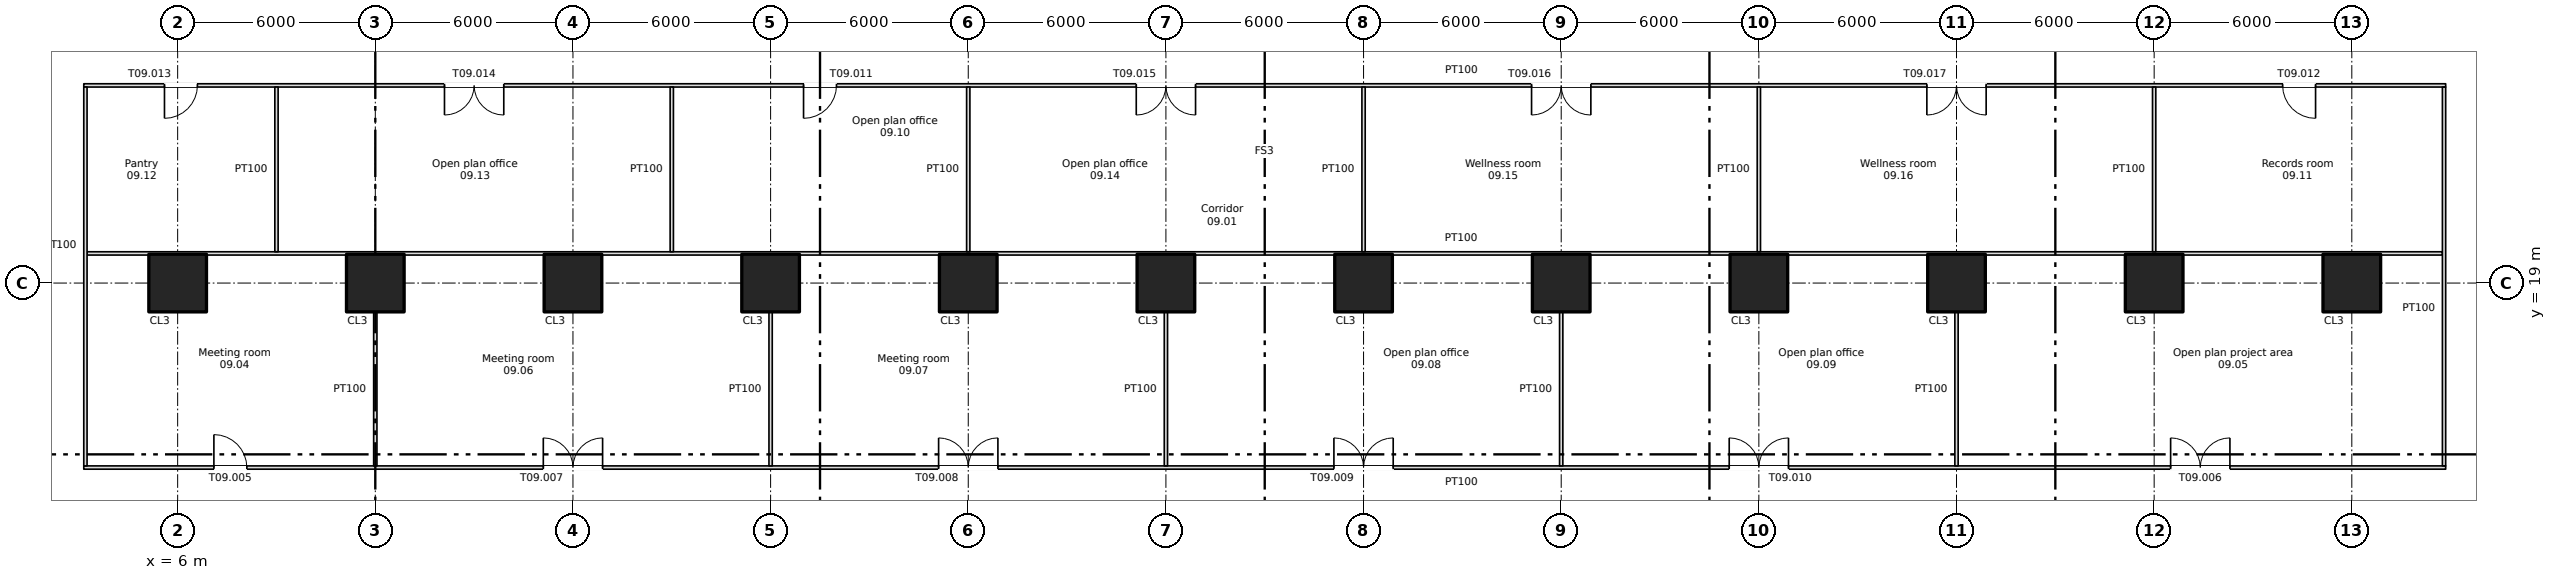
"""IFC4 building model, lengths in metres.
Left out: names, types, materials, properties, quantities, classifications, styles, units other than length and angle.
Written with IfcOpenShell. Run it as: python <this file> out.ifc"""

import sys

from ifc_helpers import new_model, si_unit, direction, frame, frame_2d, origin, origin_2d, place, context, subcontext, project, spatial, rectangle, extrude, element, fill, save


model = new_model("IFC4")
c1 = context("Model", 3, precision=1e-05, world=origin(), true_north=direction((0.0, 1.0)))
c2 = subcontext(c1, "Body", "Model", "MODEL_VIEW")
j1 = project(units=[si_unit("LENGTHUNIT", "METRE"), si_unit("PLANEANGLEUNIT", "RADIAN")], contexts=[c1])
p1 = place(None, origin())
s1 = spatial("IfcSite", under=j1, at=p1, CompositionType="ELEMENT")
p2 = place(p1, origin())
s2 = spatial("IfcBuilding", under=s1, at=p2, CompositionType="ELEMENT")
p3 = place(p2, frame((0.0, 0.0, 41.25)))
s3 = spatial("IfcBuildingStorey", under=s2, at=p3, CompositionType="ELEMENT", Elevation=41.25)
for number, where, z_axis, x_axis in (
    (1, (6.0, 19.0, 0.0), (0.0, 0.0, 1.0), (1.0, 0.0, 0.0)),
    (2, (12.0, 19.0, 0.0), (0.0, 0.0, 1.0), (1.0, 0.0, 0.0)),
    (3, (18.0, 19.0, 0.0), (0.0, 0.0, 1.0), (1.0, 0.0, 0.0)),
    (4, (24.0, 19.0, 0.0), (0.0, 0.0, 1.0), (1.0, 0.0, 0.0)),
    (5, (30.0, 19.0, 0.0), (0.0, 0.0, 1.0), (1.0, 0.0, 0.0)),
    (6, (36.0, 19.0, 0.0), (0.0, 0.0, 1.0), (1.0, 0.0, 0.0)),
    (7, (42.0, 19.0, 0.0), (0.0, 0.0, 1.0), (1.0, 0.0, 0.0)),
    (8, (48.0, 19.0, 0.0), (0.0, 0.0, 1.0), (1.0, 0.0, 0.0)),
    (9, (54.0, 19.0, 0.0), (0.0, 0.0, 1.0), (1.0, 0.0, 0.0)),
    (10, (60.0, 19.0, 0.0), (0.0, 0.0, 1.0), (1.0, 0.0, 0.0)),
    (11, (66.0, 19.0, 0.0), (0.0, 0.0, 1.0), (1.0, 0.0, 0.0)),
    (12, (72.0, 19.0, 0.0), (0.0, 0.0, 1.0), (1.0, 0.0, 0.0)),
):
    element("IfcColumn", number, at=place(p3, frame(where, z_axis=z_axis, x_axis=x_axis)), inside=s3, PredefinedType="COLUMN", context=c2, shape_type="SweptSolid", body=[
        extrude(rectangle(XDim=1.75, YDim=1.75, at=origin_2d()), origin(), (0.0, 0.0, 1.0), 3.35),
    ])
p4 = place(p3, frame((3.15, 13.4, 0.0), z_axis=(0.0, 0.0, 1.0), x_axis=(1.0, 0.0, 0.0)))
e13 = element("IfcWall", 13, at=p4, inside=s3, PredefinedType="PARTITIONING", context=c2, shape_type="SweptSolid", body=[
    extrude(rectangle(XDim=71.7, YDim=0.1, at=frame_2d((35.85, 0.0))), origin(), (0.0, 0.0, 1.0), 3.35),
])
p5 = place(p4, frame((3.95, 0.0, 0.0)))
e14 = element("IfcOpeningElement", 14, at=p5, cuts=e13, PredefinedType="OPENING", context=c2, shape_type="SweptSolid", body=[
    extrude(rectangle(XDim=1.0, YDim=2.1, at=frame_2d((0.5, 1.05))), frame((0.0, 0.06, 0.0), z_axis=(0.0, -1.0, 0.0), x_axis=(1.0, 0.0, 0.0)), (0.0, 0.0, 1.0), 0.12),
])
p6 = place(p4, frame((63.35, 0.0, 0.0)))
e15 = element("IfcOpeningElement", 15, at=p6, cuts=e13, PredefinedType="OPENING", context=c2, shape_type="SweptSolid", body=[
    extrude(rectangle(XDim=1.8, YDim=2.1, at=frame_2d((0.9, 1.05))), frame((0.0, 0.06, 0.0), z_axis=(0.0, -1.0, 0.0), x_axis=(1.0, 0.0, 0.0)), (0.0, 0.0, 1.0), 0.12),
])
p7 = place(p4, frame((13.95, 0.0, 0.0)))
e16 = element("IfcOpeningElement", 16, at=p7, cuts=e13, PredefinedType="OPENING", context=c2, shape_type="SweptSolid", body=[
    extrude(rectangle(XDim=1.8, YDim=2.1, at=frame_2d((0.9, 1.05))), frame((0.0, 0.06, 0.0), z_axis=(0.0, -1.0, 0.0), x_axis=(1.0, 0.0, 0.0)), (0.0, 0.0, 1.0), 0.12),
])
p8 = place(p4, frame((25.95, 0.0, 0.0)))
e17 = element("IfcOpeningElement", 17, at=p8, cuts=e13, PredefinedType="OPENING", context=c2, shape_type="SweptSolid", body=[
    extrude(rectangle(XDim=1.8, YDim=2.1, at=frame_2d((0.9, 1.05))), frame((0.0, 0.06, 0.0), z_axis=(0.0, -1.0, 0.0), x_axis=(1.0, 0.0, 0.0)), (0.0, 0.0, 1.0), 0.12),
])
p9 = place(p4, frame((37.95, 0.0, 0.0)))
e18 = element("IfcOpeningElement", 18, at=p9, cuts=e13, PredefinedType="OPENING", context=c2, shape_type="SweptSolid", body=[
    extrude(rectangle(XDim=1.8, YDim=2.1, at=frame_2d((0.9, 1.05))), frame((0.0, 0.06, 0.0), z_axis=(0.0, -1.0, 0.0), x_axis=(1.0, 0.0, 0.0)), (0.0, 0.0, 1.0), 0.12),
])
p10 = place(p4, frame((49.95, 0.0, 0.0)))
e19 = element("IfcOpeningElement", 19, at=p10, cuts=e13, PredefinedType="OPENING", context=c2, shape_type="SweptSolid", body=[
    extrude(rectangle(XDim=1.8, YDim=2.1, at=frame_2d((0.9, 1.05))), frame((0.0, 0.06, 0.0), z_axis=(0.0, -1.0, 0.0), x_axis=(1.0, 0.0, 0.0)), (0.0, 0.0, 1.0), 0.12),
])
p11 = place(p3, frame((3.25, 19.9, 0.0), z_axis=(0.0, 0.0, 1.0), x_axis=(1.0, 0.0, 0.0)))
e20 = element("IfcWall", 20, at=p11, inside=s3, PredefinedType="PARTITIONING", context=c2, shape_type="SweptSolid", body=[
    extrude(rectangle(XDim=71.5, YDim=0.1, at=frame_2d((35.75, 0.0))), origin(), (0.0, 0.0, 1.0), 3.35),
])
p12 = place(p3, frame((3.15, 25.0, 0.0), z_axis=(0.0, 0.0, 1.0), x_axis=(1.0, 0.0, 0.0)))
e21 = element("IfcWall", 21, at=p12, inside=s3, PredefinedType="PARTITIONING", context=c2, shape_type="SweptSolid", body=[
    extrude(rectangle(XDim=71.7, YDim=0.1, at=frame_2d((35.85, 0.0))), origin(), (0.0, 0.0, 1.0), 3.35),
])
p13 = place(p12, frame((21.85, 0.0, 0.0)))
e22 = element("IfcOpeningElement", 22, at=p13, cuts=e21, PredefinedType="OPENING", context=c2, shape_type="SweptSolid", body=[
    extrude(rectangle(XDim=1.0, YDim=2.1, at=frame_2d((0.5, 1.05))), frame((0.0, 0.06, 0.0), z_axis=(0.0, -1.0, 0.0), x_axis=(1.0, 0.0, 0.0)), (0.0, 0.0, 1.0), 0.12),
])
p14 = place(p12, frame((66.75, 0.0, 0.0)))
e23 = element("IfcOpeningElement", 23, at=p14, cuts=e21, PredefinedType="OPENING", context=c2, shape_type="SweptSolid", body=[
    extrude(rectangle(XDim=1.0, YDim=2.1, at=frame_2d((0.5, 1.05))), frame((0.0, 0.06, 0.0), z_axis=(0.0, -1.0, 0.0), x_axis=(1.0, 0.0, 0.0)), (0.0, 0.0, 1.0), 0.12),
])
p15 = place(p12, frame((2.45, 0.0, 0.0)))
e24 = element("IfcOpeningElement", 24, at=p15, cuts=e21, PredefinedType="OPENING", context=c2, shape_type="SweptSolid", body=[
    extrude(rectangle(XDim=1.0, YDim=2.1, at=frame_2d((0.5, 1.05))), frame((0.0, 0.06, 0.0), z_axis=(0.0, -1.0, 0.0), x_axis=(1.0, 0.0, 0.0)), (0.0, 0.0, 1.0), 0.12),
])
p16 = place(p12, frame((10.95, 0.0, 0.0)))
e25 = element("IfcOpeningElement", 25, at=p16, cuts=e21, PredefinedType="OPENING", context=c2, shape_type="SweptSolid", body=[
    extrude(rectangle(XDim=1.8, YDim=2.1, at=frame_2d((0.9, 1.05))), frame((0.0, 0.06, 0.0), z_axis=(0.0, -1.0, 0.0), x_axis=(1.0, 0.0, 0.0)), (0.0, 0.0, 1.0), 0.12),
])
p17 = place(p12, frame((31.95, 0.0, 0.0)))
e26 = element("IfcOpeningElement", 26, at=p17, cuts=e21, PredefinedType="OPENING", context=c2, shape_type="SweptSolid", body=[
    extrude(rectangle(XDim=1.8, YDim=2.1, at=frame_2d((0.9, 1.05))), frame((0.0, 0.06, 0.0), z_axis=(0.0, -1.0, 0.0), x_axis=(1.0, 0.0, 0.0)), (0.0, 0.0, 1.0), 0.12),
])
p18 = place(p12, frame((43.95, 0.0, 0.0)))
e27 = element("IfcOpeningElement", 27, at=p18, cuts=e21, PredefinedType="OPENING", context=c2, shape_type="SweptSolid", body=[
    extrude(rectangle(XDim=1.8, YDim=2.1, at=frame_2d((0.9, 1.05))), frame((0.0, 0.06, 0.0), z_axis=(0.0, -1.0, 0.0), x_axis=(1.0, 0.0, 0.0)), (0.0, 0.0, 1.0), 0.12),
])
p19 = place(p12, frame((55.95, 0.0, 0.0)))
e28 = element("IfcOpeningElement", 28, at=p19, cuts=e21, PredefinedType="OPENING", context=c2, shape_type="SweptSolid", body=[
    extrude(rectangle(XDim=1.8, YDim=2.1, at=frame_2d((0.9, 1.05))), frame((0.0, 0.06, 0.0), z_axis=(0.0, -1.0, 0.0), x_axis=(1.0, 0.0, 0.0)), (0.0, 0.0, 1.0), 0.12),
])
p20 = place(p3, frame((3.2, 13.45, 0.0), z_axis=(0.0, 0.0, 1.0), x_axis=(0.0, 1.0, 0.0)))
e29 = element("IfcWall", 29, at=p20, inside=s3, PredefinedType="PARTITIONING", context=c2, shape_type="SweptSolid", body=[
    extrude(rectangle(XDim=11.5, YDim=0.1, at=frame_2d((5.75, 0.0))), origin(), (0.0, 0.0, 1.0), 3.35),
])
p21 = place(p3, frame((9.0, 19.95, 0.0), z_axis=(0.0, 0.0, 1.0), x_axis=(0.0, 1.0, 0.0)))
e30 = element("IfcWall", 30, at=p21, inside=s3, PredefinedType="PARTITIONING", context=c2, shape_type="SweptSolid", body=[
    extrude(rectangle(XDim=5.0, YDim=0.1, at=frame_2d((2.5, 0.0))), origin(), (0.0, 0.0, 1.0), 3.35),
])
p22 = place(p3, frame((12.0, 13.45, 0.0), z_axis=(0.0, 0.0, 1.0), x_axis=(0.0, 1.0, 0.0)))
e31 = element("IfcWall", 31, at=p22, inside=s3, PredefinedType="PARTITIONING", context=c2, shape_type="SweptSolid", body=[
    extrude(rectangle(XDim=4.675, YDim=0.1, at=frame_2d((2.337, 0.0))), origin(), (0.0, 0.0, 1.0), 3.35),
])
p23 = place(p3, frame((21.0, 19.95, 0.0), z_axis=(0.0, 0.0, 1.0), x_axis=(0.0, 1.0, 0.0)))
e32 = element("IfcWall", 32, at=p23, inside=s3, PredefinedType="PARTITIONING", context=c2, shape_type="SweptSolid", body=[
    extrude(rectangle(XDim=5.0, YDim=0.1, at=frame_2d((2.5, 0.0))), origin(), (0.0, 0.0, 1.0), 3.35),
])
p24 = place(p3, frame((24.0, 13.45, 0.0), z_axis=(0.0, 0.0, 1.0), x_axis=(0.0, 1.0, 0.0)))
e33 = element("IfcWall", 33, at=p24, inside=s3, PredefinedType="PARTITIONING", context=c2, shape_type="SweptSolid", body=[
    extrude(rectangle(XDim=4.675, YDim=0.1, at=frame_2d((2.337, 0.0))), origin(), (0.0, 0.0, 1.0), 3.35),
])
p25 = place(p3, frame((30.0, 19.95, 0.0), z_axis=(0.0, 0.0, 1.0), x_axis=(0.0, 1.0, 0.0)))
e34 = element("IfcWall", 34, at=p25, inside=s3, PredefinedType="PARTITIONING", context=c2, shape_type="SweptSolid", body=[
    extrude(rectangle(XDim=5.0, YDim=0.1, at=frame_2d((2.5, 0.0))), origin(), (0.0, 0.0, 1.0), 3.35),
])
p26 = place(p3, frame((36.0, 13.45, 0.0), z_axis=(0.0, 0.0, 1.0), x_axis=(0.0, 1.0, 0.0)))
e35 = element("IfcWall", 35, at=p26, inside=s3, PredefinedType="PARTITIONING", context=c2, shape_type="SweptSolid", body=[
    extrude(rectangle(XDim=4.675, YDim=0.1, at=frame_2d((2.337, 0.0))), origin(), (0.0, 0.0, 1.0), 3.35),
])
p27 = place(p3, frame((42.0, 19.95, 0.0), z_axis=(0.0, 0.0, 1.0), x_axis=(0.0, 1.0, 0.0)))
e36 = element("IfcWall", 36, at=p27, inside=s3, PredefinedType="PARTITIONING", context=c2, shape_type="SweptSolid", body=[
    extrude(rectangle(XDim=5.0, YDim=0.1, at=frame_2d((2.5, 0.0))), origin(), (0.0, 0.0, 1.0), 3.35),
])
p28 = place(p3, frame((48.0, 13.45, 0.0), z_axis=(0.0, 0.0, 1.0), x_axis=(0.0, 1.0, 0.0)))
e37 = element("IfcWall", 37, at=p28, inside=s3, PredefinedType="PARTITIONING", context=c2, shape_type="SweptSolid", body=[
    extrude(rectangle(XDim=4.675, YDim=0.1, at=frame_2d((2.337, 0.0))), origin(), (0.0, 0.0, 1.0), 3.35),
])
p29 = place(p3, frame((54.0, 19.95, 0.0), z_axis=(0.0, 0.0, 1.0), x_axis=(0.0, 1.0, 0.0)))
e38 = element("IfcWall", 38, at=p29, inside=s3, PredefinedType="PARTITIONING", context=c2, shape_type="SweptSolid", body=[
    extrude(rectangle(XDim=5.0, YDim=0.1, at=frame_2d((2.5, 0.0))), origin(), (0.0, 0.0, 1.0), 3.35),
])
p30 = place(p3, frame((60.0, 13.45, 0.0), z_axis=(0.0, 0.0, 1.0), x_axis=(0.0, 1.0, 0.0)))
e39 = element("IfcWall", 39, at=p30, inside=s3, PredefinedType="PARTITIONING", context=c2, shape_type="SweptSolid", body=[
    extrude(rectangle(XDim=4.675, YDim=0.1, at=frame_2d((2.337, 0.0))), origin(), (0.0, 0.0, 1.0), 3.35),
])
p31 = place(p3, frame((66.0, 19.95, 0.0), z_axis=(0.0, 0.0, 1.0), x_axis=(0.0, 1.0, 0.0)))
e40 = element("IfcWall", 40, at=p31, inside=s3, PredefinedType="PARTITIONING", context=c2, shape_type="SweptSolid", body=[
    extrude(rectangle(XDim=5.0, YDim=0.1, at=frame_2d((2.5, 0.0))), origin(), (0.0, 0.0, 1.0), 3.35),
])
p32 = place(p3, frame((74.8, 13.45, 0.0), z_axis=(0.0, 0.0, 1.0), x_axis=(0.0, 1.0, 0.0)))
e41 = element("IfcWall", 41, at=p32, inside=s3, PredefinedType="PARTITIONING", context=c2, shape_type="SweptSolid", body=[
    extrude(rectangle(XDim=11.5, YDim=0.1, at=frame_2d((5.75, 0.0))), origin(), (0.0, 0.0, 1.0), 3.35),
])
p33 = place(p5, origin())
e42 = element("IfcDoor", 42, at=p33, inside=s3, OperationType="SINGLE_SWING_LEFT", PredefinedType="DOOR", context=c2, shape_type="SweptSolid", body=[
    extrude(rectangle(XDim=1.0, YDim=2.1, at=frame_2d((0.5, 1.05))), frame((0.0, 0.025, 0.0), z_axis=(0.0, -1.0, 0.0), x_axis=(1.0, 0.0, 0.0)), (0.0, 0.0, 1.0), 0.05),
])
fill(e14, e42)
p34 = place(p6, origin())
e43 = element("IfcDoor", 43, at=p34, inside=s3, OperationType="DOUBLE_DOOR_SINGLE_SWING", PredefinedType="DOOR", context=c2, shape_type="SweptSolid", body=[
    extrude(rectangle(XDim=1.8, YDim=2.1, at=frame_2d((0.9, 1.05))), frame((0.0, 0.025, 0.0), z_axis=(0.0, -1.0, 0.0), x_axis=(1.0, 0.0, 0.0)), (0.0, 0.0, 1.0), 0.05),
])
fill(e15, e43)
p35 = place(p7, origin())
e44 = element("IfcDoor", 44, at=p35, inside=s3, OperationType="DOUBLE_DOOR_SINGLE_SWING", PredefinedType="DOOR", context=c2, shape_type="SweptSolid", body=[
    extrude(rectangle(XDim=1.8, YDim=2.1, at=frame_2d((0.9, 1.05))), frame((0.0, 0.025, 0.0), z_axis=(0.0, -1.0, 0.0), x_axis=(1.0, 0.0, 0.0)), (0.0, 0.0, 1.0), 0.05),
])
fill(e16, e44)
p36 = place(p8, origin())
e45 = element("IfcDoor", 45, at=p36, inside=s3, OperationType="DOUBLE_DOOR_SINGLE_SWING", PredefinedType="DOOR", context=c2, shape_type="SweptSolid", body=[
    extrude(rectangle(XDim=1.8, YDim=2.1, at=frame_2d((0.9, 1.05))), frame((0.0, 0.025, 0.0), z_axis=(0.0, -1.0, 0.0), x_axis=(1.0, 0.0, 0.0)), (0.0, 0.0, 1.0), 0.05),
])
fill(e17, e45)
p37 = place(p9, origin())
e46 = element("IfcDoor", 46, at=p37, inside=s3, OperationType="DOUBLE_DOOR_SINGLE_SWING", PredefinedType="DOOR", context=c2, shape_type="SweptSolid", body=[
    extrude(rectangle(XDim=1.8, YDim=2.1, at=frame_2d((0.9, 1.05))), frame((0.0, 0.025, 0.0), z_axis=(0.0, -1.0, 0.0), x_axis=(1.0, 0.0, 0.0)), (0.0, 0.0, 1.0), 0.05),
])
fill(e18, e46)
p38 = place(p10, origin())
e47 = element("IfcDoor", 47, at=p38, inside=s3, OperationType="DOUBLE_DOOR_SINGLE_SWING", PredefinedType="DOOR", context=c2, shape_type="SweptSolid", body=[
    extrude(rectangle(XDim=1.8, YDim=2.1, at=frame_2d((0.9, 1.05))), frame((0.0, 0.025, 0.0), z_axis=(0.0, -1.0, 0.0), x_axis=(1.0, 0.0, 0.0)), (0.0, 0.0, 1.0), 0.05),
])
fill(e19, e47)
p39 = place(p13, origin())
e48 = element("IfcDoor", 48, at=p39, inside=s3, OperationType="SINGLE_SWING_LEFT", PredefinedType="DOOR", context=c2, shape_type="SweptSolid", body=[
    extrude(rectangle(XDim=1.0, YDim=2.1, at=frame_2d((0.5, 1.05))), frame((0.0, 0.025, 0.0), z_axis=(0.0, -1.0, 0.0), x_axis=(1.0, 0.0, 0.0)), (0.0, 0.0, 1.0), 0.05),
])
fill(e22, e48)
p40 = place(p14, origin())
e49 = element("IfcDoor", 49, at=p40, inside=s3, OperationType="SINGLE_SWING_RIGHT", PredefinedType="DOOR", context=c2, shape_type="SweptSolid", body=[
    extrude(rectangle(XDim=1.0, YDim=2.1, at=frame_2d((0.5, 1.05))), frame((0.0, 0.025, 0.0), z_axis=(0.0, -1.0, 0.0), x_axis=(1.0, 0.0, 0.0)), (0.0, 0.0, 1.0), 0.05),
])
fill(e23, e49)
p41 = place(p15, origin())
e50 = element("IfcDoor", 50, at=p41, inside=s3, OperationType="SINGLE_SWING_LEFT", PredefinedType="DOOR", context=c2, shape_type="SweptSolid", body=[
    extrude(rectangle(XDim=1.0, YDim=2.1, at=frame_2d((0.5, 1.05))), frame((0.0, 0.025, 0.0), z_axis=(0.0, -1.0, 0.0), x_axis=(1.0, 0.0, 0.0)), (0.0, 0.0, 1.0), 0.05),
])
fill(e24, e50)
p42 = place(p16, origin())
e51 = element("IfcDoor", 51, at=p42, inside=s3, OperationType="DOUBLE_DOOR_SINGLE_SWING", PredefinedType="DOOR", context=c2, shape_type="SweptSolid", body=[
    extrude(rectangle(XDim=1.8, YDim=2.1, at=frame_2d((0.9, 1.05))), frame((0.0, 0.025, 0.0), z_axis=(0.0, -1.0, 0.0), x_axis=(1.0, 0.0, 0.0)), (0.0, 0.0, 1.0), 0.05),
])
fill(e25, e51)
p43 = place(p17, origin())
e52 = element("IfcDoor", 52, at=p43, inside=s3, OperationType="DOUBLE_DOOR_SINGLE_SWING", PredefinedType="DOOR", context=c2, shape_type="SweptSolid", body=[
    extrude(rectangle(XDim=1.8, YDim=2.1, at=frame_2d((0.9, 1.05))), frame((0.0, 0.025, 0.0), z_axis=(0.0, -1.0, 0.0), x_axis=(1.0, 0.0, 0.0)), (0.0, 0.0, 1.0), 0.05),
])
fill(e26, e52)
p44 = place(p18, origin())
e53 = element("IfcDoor", 53, at=p44, inside=s3, OperationType="DOUBLE_DOOR_SINGLE_SWING", PredefinedType="DOOR", context=c2, shape_type="SweptSolid", body=[
    extrude(rectangle(XDim=1.8, YDim=2.1, at=frame_2d((0.9, 1.05))), frame((0.0, 0.025, 0.0), z_axis=(0.0, -1.0, 0.0), x_axis=(1.0, 0.0, 0.0)), (0.0, 0.0, 1.0), 0.05),
])
fill(e27, e53)
p45 = place(p19, origin())
e54 = element("IfcDoor", 54, at=p45, inside=s3, OperationType="DOUBLE_DOOR_SINGLE_SWING", PredefinedType="DOOR", context=c2, shape_type="SweptSolid", body=[
    extrude(rectangle(XDim=1.8, YDim=2.1, at=frame_2d((0.9, 1.05))), frame((0.0, 0.025, 0.0), z_axis=(0.0, -1.0, 0.0), x_axis=(1.0, 0.0, 0.0)), (0.0, 0.0, 1.0), 0.05),
])
fill(e28, e54)
save(model, sys.argv[1])
